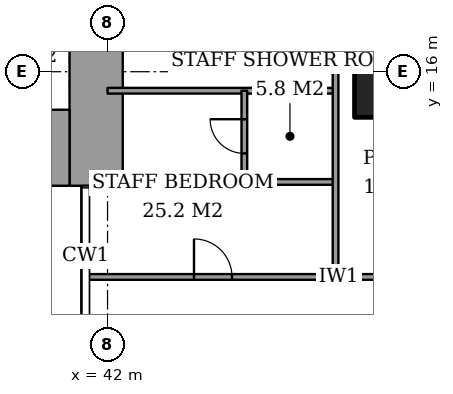
"""IFC4 building model, lengths in metres.
Left out: names, types, materials, properties, quantities, classifications, styles, units other than length and angle.
Written with IfcOpenShell. Run it as: python <this file> out.ifc"""

import sys

from ifc_helpers import new_model, si_unit, direction, frame, frame_2d, origin, origin_2d, place, context, subcontext, project, spatial, rectangle, extrude, element, fill, save


model = new_model("IFC4")
c1 = context("Model", 3, precision=1e-05, world=origin(), true_north=direction((0.0, 1.0)))
c2 = subcontext(c1, "Body", "Model", "MODEL_VIEW")
j1 = project(units=[si_unit("LENGTHUNIT", "METRE"), si_unit("PLANEANGLEUNIT", "RADIAN")], contexts=[c1])
p1 = place(None, origin())
s1 = spatial("IfcSite", under=j1, at=p1, CompositionType="ELEMENT")
p2 = place(p1, origin())
s2 = spatial("IfcBuilding", under=s1, at=p2, CompositionType="ELEMENT")
p3 = place(p2, frame((0.0, 0.0, 266.4)))
s3 = spatial("IfcBuildingStorey", under=s2, at=p3, CompositionType="ELEMENT", Elevation=266.4)
p4 = place(p3, frame((50.0, 16.0, 0.0), z_axis=(0.0, 0.0, 1.0), x_axis=(1.0, 0.0, 0.0)))
e1 = element("IfcColumn", 1, at=p4, inside=s3, PredefinedType="COLUMN", context=c2, shape_type="SweptSolid", body=[
    extrude(rectangle(XDim=3.0, YDim=2.4, at=origin_2d()), origin(), (0.0, 0.0, 1.0), 3.6),
])
p5 = place(p3, frame((37.85, 14.0, 0.0), z_axis=(0.0, 0.0, 1.0), x_axis=(1.0, 0.0, 0.0)))
e2 = element("IfcWall", 2, at=p5, inside=s3, PredefinedType="SHEAR", context=c2, shape_type="SweptSolid", body=[
    extrude(rectangle(XDim=3.15, YDim=2.0, at=frame_2d((1.575, 0.0))), origin(), (0.0, 0.0, 1.0), 3.6),
])
p6 = place(p3, frame((41.7, 13.0, 0.0), z_axis=(0.0, 0.0, 1.0), x_axis=(0.0, 1.0, 0.0)))
e3 = element("IfcWall", 3, at=p6, inside=s3, PredefinedType="SHEAR", context=c2, shape_type="SweptSolid", body=[
    extrude(rectangle(XDim=11.85, YDim=1.4, at=frame_2d((5.925, 0.0))), origin(), (0.0, 0.0, 1.0), 3.6),
])
p7 = place(p6, frame((7.5, 0.0, 0.0)))
e4 = element("IfcOpeningElement", 4, at=p7, cuts=e3, PredefinedType="OPENING", context=c2, shape_type="SweptSolid", body=[
    extrude(rectangle(XDim=1.8, YDim=2.4, at=frame_2d((0.9, 1.2))), frame((0.0, 0.71, 0.0), z_axis=(0.0, -1.0, 0.0), x_axis=(1.0, 0.0, 0.0)), (0.0, 0.0, 1.0), 1.42),
])
p8 = place(p3, frame((41.439, 10.6, 0.0), z_axis=(0.0, 0.0, 1.0), x_axis=(1.0, 0.0, 0.0)))
e5 = element("IfcWall", 5, at=p8, inside=s3, PredefinedType="PARTITIONING", context=c2, shape_type="SweptSolid", body=[
    extrude(rectangle(XDim=14.761, YDim=0.15, at=frame_2d((7.38, 0.0))), origin(), (0.0, 0.0, 1.0), 3.35),
])
p9 = place(p8, frame((10.761, 0.0, 0.0)))
e6 = element("IfcOpeningElement", 6, at=p9, cuts=e5, PredefinedType="OPENING", context=c2, shape_type="SweptSolid", body=[
    extrude(rectangle(XDim=1.0, YDim=2.1, at=frame_2d((0.5, 1.05))), frame((0.0, 0.085, 0.0), z_axis=(0.0, -1.0, 0.0), x_axis=(1.0, 0.0, 0.0)), (0.0, 0.0, 1.0), 0.17),
])
p10 = place(p8, frame((13.061, 0.0, 0.0)))
e7 = element("IfcOpeningElement", 7, at=p10, cuts=e5, PredefinedType="OPENING", context=c2, shape_type="SweptSolid", body=[
    extrude(rectangle(XDim=1.0, YDim=2.1, at=frame_2d((0.5, 1.05))), frame((0.0, 0.085, 0.0), z_axis=(0.0, -1.0, 0.0), x_axis=(1.0, 0.0, 0.0)), (0.0, 0.0, 1.0), 0.17),
])
p11 = place(p8, frame((7.911, 0.0, 0.0)))
e8 = element("IfcOpeningElement", 8, at=p11, cuts=e5, PredefinedType="OPENING", context=c2, shape_type="SweptSolid", body=[
    extrude(rectangle(XDim=0.9, YDim=2.1, at=frame_2d((0.45, 1.05))), frame((0.0, 0.085, 0.0), z_axis=(0.0, -1.0, 0.0), x_axis=(1.0, 0.0, 0.0)), (0.0, 0.0, 1.0), 0.17),
])
p12 = place(p8, frame((2.836, 0.0, 0.0)))
e9 = element("IfcOpeningElement", 9, at=p12, cuts=e5, PredefinedType="OPENING", context=c2, shape_type="SweptSolid", body=[
    extrude(rectangle(XDim=1.0, YDim=2.1, at=frame_2d((0.5, 1.05))), frame((0.0, 0.085, 0.0), z_axis=(0.0, -1.0, 0.0), x_axis=(1.0, 0.0, 0.0)), (0.0, 0.0, 1.0), 0.17),
])
p13 = place(p3, frame((45.6, 13.1, 0.0), z_axis=(0.0, 0.0, 1.0), x_axis=(1.0, 0.0, 0.0)))
e10 = element("IfcWall", 10, at=p13, inside=s3, PredefinedType="PARTITIONING", context=c2, shape_type="SweptSolid", body=[
    extrude(rectangle(XDim=2.4, YDim=0.15, at=frame_2d((1.2, 0.0))), origin(), (0.0, 0.0, 1.0), 3.35),
])
p14 = place(p3, frame((42.0, 15.5, 0.0), z_axis=(0.0, 0.0, 1.0), x_axis=(1.0, 0.0, 0.0)))
e11 = element("IfcWall", 11, at=p14, inside=s3, PredefinedType="PARTITIONING", context=c2, shape_type="SweptSolid", body=[
    extrude(rectangle(XDim=6.0, YDim=0.15, at=frame_2d((3.0, 0.0))), origin(), (0.0, 0.0, 1.0), 3.35),
])
p15 = place(p3, frame((48.0, 16.05, 0.0), z_axis=(0.0, 0.0, 1.0), x_axis=(1.0, 0.0, 0.0)))
e12 = element("IfcWall", 12, at=p15, inside=s3, PredefinedType="PARTITIONING", context=c2, shape_type="SweptSolid", body=[
    extrude(rectangle(XDim=0.5, YDim=0.15, at=frame_2d((0.25, 0.0))), origin(), (0.0, 0.0, 1.0), 2.634),
])
p16 = place(p3, frame((45.6, 13.1, 0.0), z_axis=(0.0, 0.0, 1.0), x_axis=(0.0, 1.0, 0.0)))
e13 = element("IfcWall", 13, at=p16, inside=s3, PredefinedType="PARTITIONING", context=c2, shape_type="SweptSolid", body=[
    extrude(rectangle(XDim=2.4, YDim=0.15, at=frame_2d((1.2, 0.0))), origin(), (0.0, 0.0, 1.0), 3.35),
])
p17 = place(p16, frame((0.75, 0.0, 0.0)))
e14 = element("IfcOpeningElement", 14, at=p17, cuts=e13, PredefinedType="OPENING", context=c2, shape_type="SweptSolid", body=[
    extrude(rectangle(XDim=0.9, YDim=2.1, at=frame_2d((0.45, 1.05))), frame((0.0, 0.085, 0.0), z_axis=(0.0, -1.0, 0.0), x_axis=(1.0, 0.0, 0.0)), (0.0, 0.0, 1.0), 0.17),
])
p18 = place(p3, frame((48.0, 10.6, 0.0), z_axis=(0.0, 0.0, 1.0), x_axis=(0.0, 1.0, 0.0)))
e15 = element("IfcWall", 15, at=p18, inside=s3, PredefinedType="PARTITIONING", context=c2, shape_type="SweptSolid", body=[
    extrude(rectangle(XDim=5.9, YDim=0.15, at=frame_2d((2.95, 0.0))), origin(), (0.0, 0.0, 1.0), 3.35),
])
p19 = place(p17, origin())
e16 = element("IfcDoor", 16, at=p19, inside=s3, OperationType="SINGLE_SWING_LEFT", PredefinedType="DOOR", context=c2, shape_type="SweptSolid", body=[
    extrude(rectangle(XDim=0.9, YDim=2.1, at=frame_2d((0.45, 1.05))), frame((0.0, 0.025, 0.0), z_axis=(0.0, -1.0, 0.0), x_axis=(1.0, 0.0, 0.0)), (0.0, 0.0, 1.0), 0.05),
])
fill(e14, e16)
p20 = place(p12, origin())
e17 = element("IfcDoor", 17, at=p20, inside=s3, OperationType="SINGLE_SWING_RIGHT", PredefinedType="DOOR", context=c2, shape_type="SweptSolid", body=[
    extrude(rectangle(XDim=1.0, YDim=2.1, at=frame_2d((0.5, 1.05))), frame((0.0, 0.025, 0.0), z_axis=(0.0, -1.0, 0.0), x_axis=(1.0, 0.0, 0.0)), (0.0, 0.0, 1.0), 0.05),
])
fill(e9, e17)
save(model, sys.argv[1])
